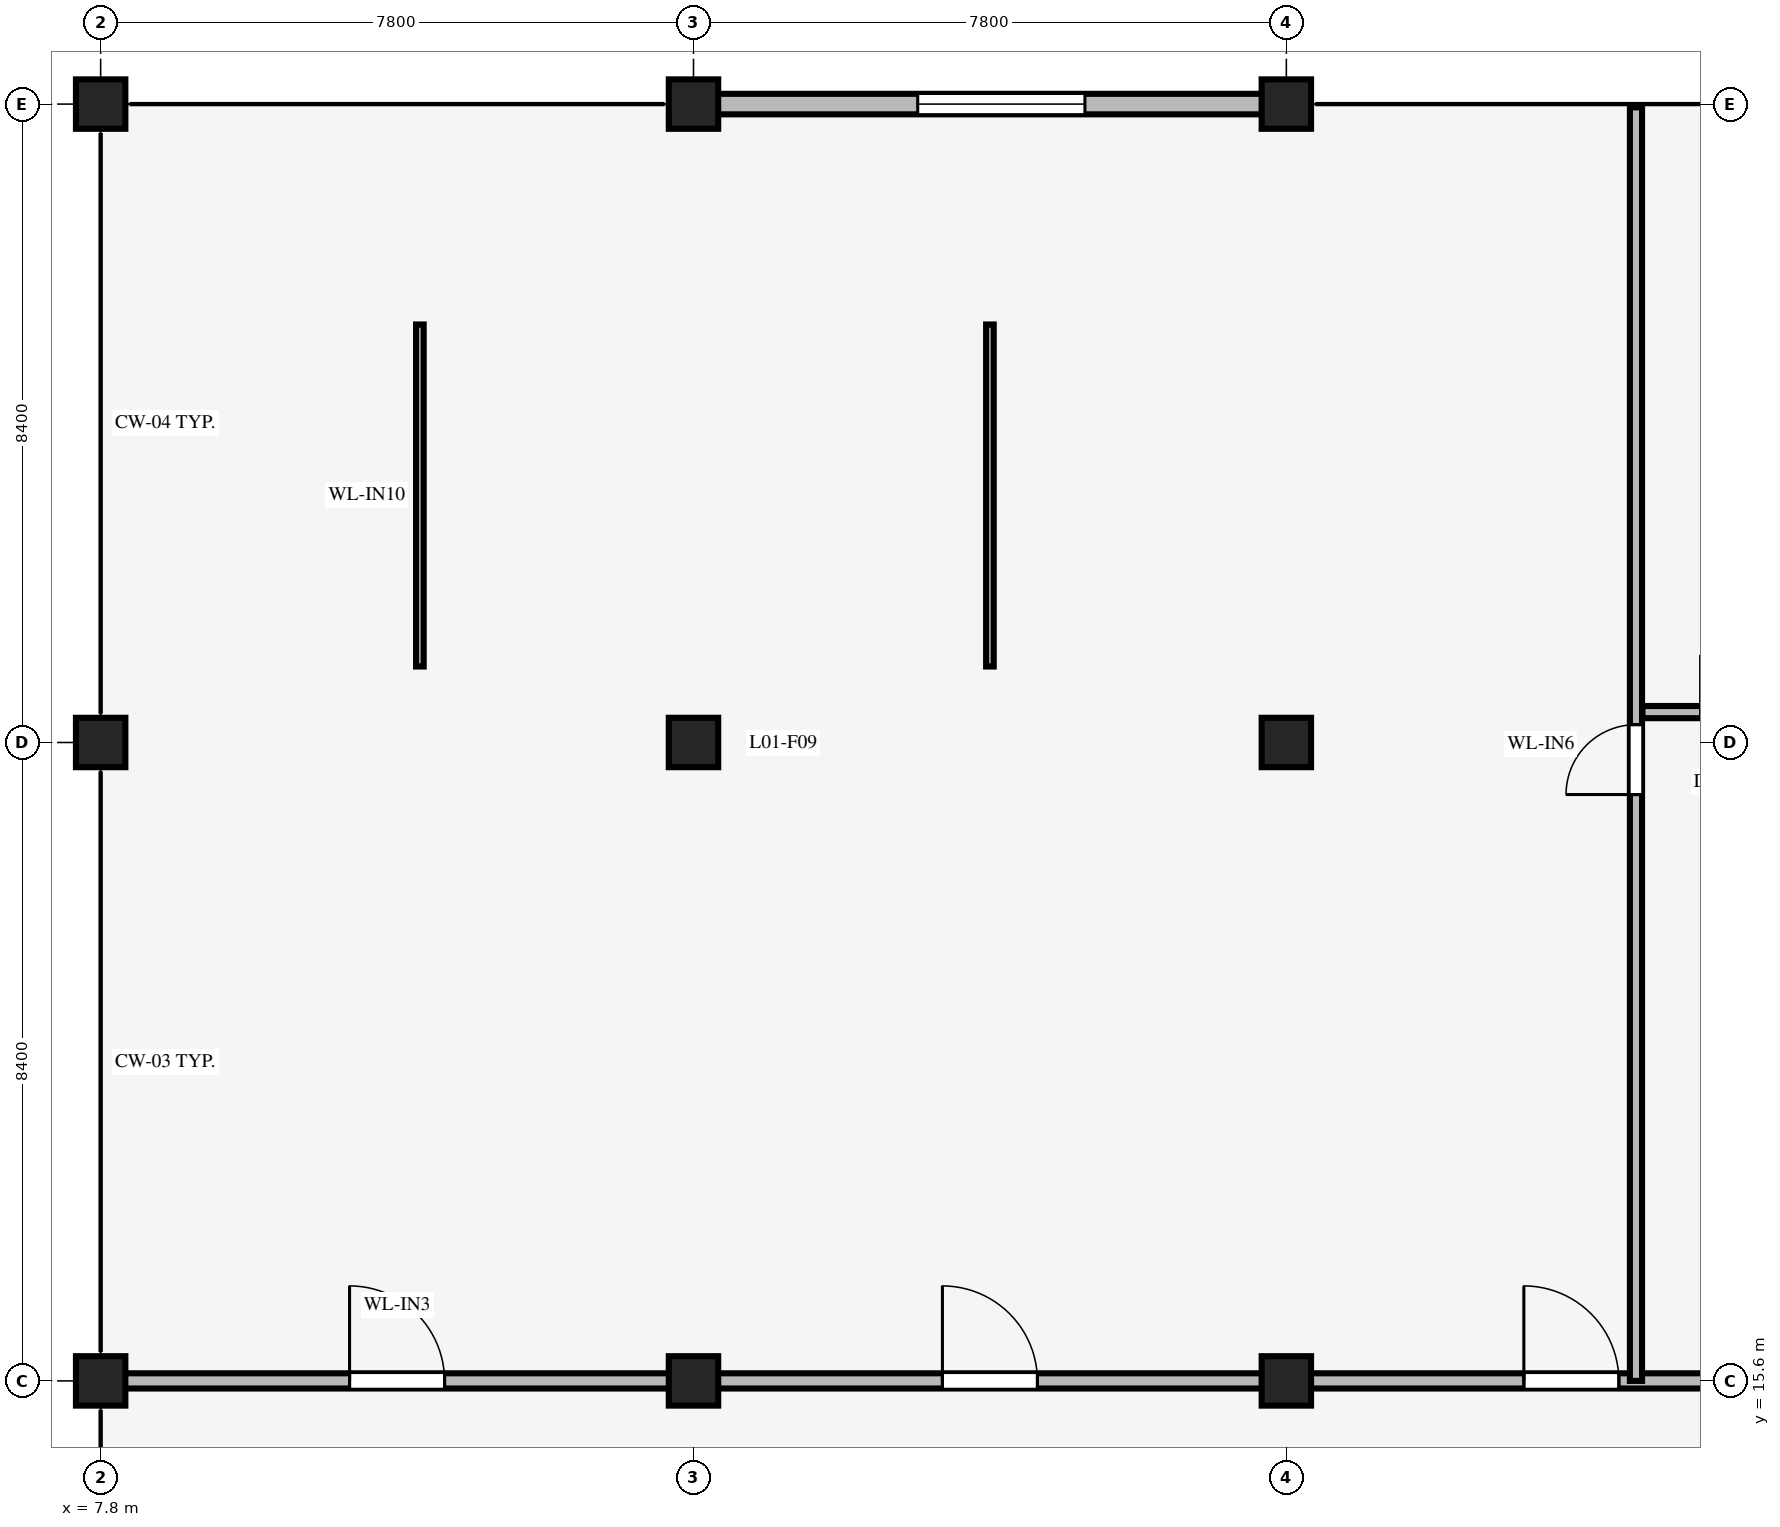
"""IFC4 building model, lengths in metres.
Left out: names, types, materials, properties, quantities, classifications, styles, units other than length and angle.
Written with IfcOpenShell. Run it as: python <this file> out.ifc"""

import sys

from ifc_helpers import new_model, si_unit, direction, frame, frame_2d, origin, origin_2d, place, context, subcontext, project, spatial, rectangle, extrude, element, fill, save


model = new_model("IFC4")
c1 = context("Model", 3, precision=1e-05, world=origin(), true_north=direction((0.0, 1.0)))
c2 = subcontext(c1, "Body", "Model", "MODEL_VIEW")
j1 = project(units=[si_unit("LENGTHUNIT", "METRE"), si_unit("PLANEANGLEUNIT", "RADIAN")], contexts=[c1])
p1 = place(None, origin())
s1 = spatial("IfcSite", under=j1, at=p1, CompositionType="ELEMENT")
p2 = place(p1, origin())
s2 = spatial("IfcBuilding", under=s1, at=p2, CompositionType="ELEMENT")
p3 = place(p2, frame((0.0, 0.0, 6.0)))
s3 = spatial("IfcBuildingStorey", under=s2, at=p3, CompositionType="ELEMENT", Elevation=6.0)
for number, where, z_axis, x_axis in (
    (1, (7.8, 15.6, 0.0), (0.0, 0.0, 1.0), (1.0, 0.0, 0.0)),
    (2, (7.8, 24.0, 0.0), (0.0, 0.0, 1.0), (1.0, 0.0, 0.0)),
    (3, (7.8, 32.4, 0.0), (0.0, 0.0, 1.0), (1.0, 0.0, 0.0)),
    (4, (15.6, 15.6, 0.0), (0.0, 0.0, 1.0), (1.0, 0.0, 0.0)),
    (5, (15.6, 24.0, 0.0), (0.0, 0.0, 1.0), (1.0, 0.0, 0.0)),
    (6, (15.6, 32.4, 0.0), (0.0, 0.0, 1.0), (1.0, 0.0, 0.0)),
    (7, (23.4, 15.6, 0.0), (0.0, 0.0, 1.0), (1.0, 0.0, 0.0)),
    (8, (23.4, 24.0, 0.0), (0.0, 0.0, 1.0), (1.0, 0.0, 0.0)),
    (9, (23.4, 32.4, 0.0), (0.0, 0.0, 1.0), (1.0, 0.0, 0.0)),
):
    element("IfcColumn", number, at=place(p3, frame(where, z_axis=z_axis, x_axis=x_axis)), inside=s3, PredefinedType="COLUMN", context=c2, shape_type="SweptSolid", body=[
        extrude(rectangle(XDim=0.65, YDim=0.65, at=origin_2d()), origin(), (0.0, 0.0, 1.0), 6.0),
    ])
p4 = place(p3, frame((15.915, 32.4, 0.0), z_axis=(0.0, 0.0, 1.0), x_axis=(1.0, 0.0, 0.0)))
e10 = element("IfcWall", 10, at=p4, inside=s3, PredefinedType="STANDARD", context=c2, shape_type="SweptSolid", body=[
    extrude(rectangle(XDim=7.17, YDim=0.27, at=frame_2d((3.585, 0.0))), origin(), (0.0, 0.0, 1.0), 5.371),
])
p5 = place(p4, frame((2.635, 0.0, 0.95)))
e11 = element("IfcOpeningElement", 11, at=p5, cuts=e10, PredefinedType="OPENING", context=c2, shape_type="SweptSolid", body=[
    extrude(rectangle(XDim=2.2, YDim=1.9, at=frame_2d((1.1, 0.95))), frame((0.0, 0.145, 0.0), z_axis=(0.0, -1.0, 0.0), x_axis=(1.0, 0.0, 0.0)), (0.0, 0.0, 1.0), 0.29),
])
p6 = place(p3, frame((8.1, 15.6, 0.0), z_axis=(0.0, 0.0, 1.0), x_axis=(1.0, 0.0, 0.0)))
e12 = element("IfcWall", 12, at=p6, inside=s3, PredefinedType="STANDARD", context=c2, shape_type="SweptSolid", body=[
    extrude(rectangle(XDim=7.2, YDim=0.2, at=frame_2d((3.6, 0.0))), origin(), (0.0, 0.0, 1.0), 3.15),
])
p7 = place(p6, frame((2.975, 0.0, 0.0)))
e13 = element("IfcOpeningElement", 13, at=p7, cuts=e12, PredefinedType="OPENING", context=c2, shape_type="SweptSolid", body=[
    extrude(rectangle(XDim=1.25, YDim=2.2, at=frame_2d((0.625, 1.1))), frame((0.0, 0.11, 0.0), z_axis=(0.0, -1.0, 0.0), x_axis=(1.0, 0.0, 0.0)), (0.0, 0.0, 1.0), 0.22),
])
p8 = place(p3, frame((15.9, 15.6, 0.0), z_axis=(0.0, 0.0, 1.0), x_axis=(1.0, 0.0, 0.0)))
e14 = element("IfcWall", 14, at=p8, inside=s3, PredefinedType="STANDARD", context=c2, shape_type="SweptSolid", body=[
    extrude(rectangle(XDim=7.2, YDim=0.2, at=frame_2d((3.6, 0.0))), origin(), (0.0, 0.0, 1.0), 3.15),
])
p9 = place(p8, frame((2.975, 0.0, 0.0)))
e15 = element("IfcOpeningElement", 15, at=p9, cuts=e14, PredefinedType="OPENING", context=c2, shape_type="SweptSolid", body=[
    extrude(rectangle(XDim=1.25, YDim=2.2, at=frame_2d((0.625, 1.1))), frame((0.0, 0.11, 0.0), z_axis=(0.0, -1.0, 0.0), x_axis=(1.0, 0.0, 0.0)), (0.0, 0.0, 1.0), 0.22),
])
p10 = place(p3, frame((23.7, 15.6, 0.0), z_axis=(0.0, 0.0, 1.0), x_axis=(1.0, 0.0, 0.0)))
e16 = element("IfcWall", 16, at=p10, inside=s3, PredefinedType="STANDARD", context=c2, shape_type="SweptSolid", body=[
    extrude(rectangle(XDim=7.2, YDim=0.2, at=frame_2d((3.6, 0.0))), origin(), (0.0, 0.0, 1.0), 3.15),
])
p11 = place(p10, frame((2.825, 0.0, 0.0)))
e17 = element("IfcOpeningElement", 17, at=p11, cuts=e16, PredefinedType="OPENING", context=c2, shape_type="SweptSolid", body=[
    extrude(rectangle(XDim=1.25, YDim=2.2, at=frame_2d((0.625, 1.1))), frame((0.0, 0.11, 0.0), z_axis=(0.0, -1.0, 0.0), x_axis=(1.0, 0.0, 0.0)), (0.0, 0.0, 1.0), 0.22),
])
p12 = place(p3, frame((28.0, 15.6, 0.0), z_axis=(0.0, 0.0, 1.0), x_axis=(0.0, 1.0, 0.0)))
e18 = element("IfcWall", 18, at=p12, inside=s3, PredefinedType="STANDARD", context=c2, shape_type="SweptSolid", body=[
    extrude(rectangle(XDim=16.757, YDim=0.16, at=frame_2d((8.379, 0.0))), origin(), (0.0, 0.0, 1.0), 3.15),
])
p13 = place(p12, frame((7.715, 0.0, 0.0)))
e19 = element("IfcOpeningElement", 19, at=p13, cuts=e18, PredefinedType="OPENING", context=c2, shape_type="SweptSolid", body=[
    extrude(rectangle(XDim=0.92, YDim=2.15, at=frame_2d((0.46, 1.075))), frame((0.0, 0.09, 0.0), z_axis=(0.0, -1.0, 0.0), x_axis=(1.0, 0.0, 0.0)), (0.0, 0.0, 1.0), 0.18),
])
for number, where, z_axis, x_axis in (
    (20, (12.0, 25.0, 0.0), (0.0, 0.0, 1.0), (0.0, 1.0, 0.0)),
    (21, (19.5, 25.0, 0.0), (0.0, 0.0, 1.0), (0.0, 1.0, 0.0)),
):
    element("IfcWall", number, at=place(p3, frame(where, z_axis=z_axis, x_axis=x_axis)), inside=s3, PredefinedType="STANDARD", context=c2, shape_type="SweptSolid", body=[
        extrude(rectangle(XDim=4.5, YDim=0.1, at=frame_2d((2.25, 0.0))), origin(), (0.0, 0.0, 1.0), 3.15),
    ])
p14 = place(p3, frame((28.085, 24.4, 0.0), z_axis=(0.0, 0.0, 1.0), x_axis=(1.0, 0.0, 0.0)))
e22 = element("IfcWall", 22, at=p14, inside=s3, PredefinedType="STANDARD", context=c2, shape_type="SweptSolid", body=[
    extrude(rectangle(XDim=8.615, YDim=0.16, at=frame_2d((4.308, 0.0))), origin(), (0.0, 0.0, 1.0), 3.15),
])
p15 = place(p14, frame((0.765, 0.0, 0.0)))
e23 = element("IfcOpeningElement", 23, at=p15, cuts=e22, PredefinedType="OPENING", context=c2, shape_type="SweptSolid", body=[
    extrude(rectangle(XDim=1.5, YDim=2.2, at=frame_2d((0.75, 1.1))), frame((0.0, 0.09, 0.0), z_axis=(0.0, -1.0, 0.0), x_axis=(1.0, 0.0, 0.0)), (0.0, 0.0, 1.0), 0.18),
])
p16 = place(p14, frame((2.715, 0.0, 0.9)))
e24 = element("IfcOpeningElement", 24, at=p16, cuts=e22, PredefinedType="OPENING", context=c2, shape_type="SweptSolid", body=[
    extrude(rectangle(XDim=1.8, YDim=1.8, at=frame_2d((0.9, 0.9))), frame((0.0, 0.09, 0.0), z_axis=(0.0, -1.0, 0.0), x_axis=(1.0, 0.0, 0.0)), (0.0, 0.0, 1.0), 0.18),
])
p17 = place(p5, origin())
e25 = element("IfcWindow", 25, at=p17, inside=s3, PartitioningType="SINGLE_PANEL", PredefinedType="WINDOW", context=c2, shape_type="SweptSolid", body=[
    extrude(rectangle(XDim=2.2, YDim=1.9, at=frame_2d((1.1, 0.95))), frame((0.0, 0.03, 0.0), z_axis=(0.0, -1.0, 0.0), x_axis=(1.0, 0.0, 0.0)), (0.0, 0.0, 1.0), 0.06),
])
fill(e11, e25)
p18 = place(p7, origin())
e26 = element("IfcDoor", 26, at=p18, inside=s3, OperationType="SINGLE_SWING_LEFT", PredefinedType="DOOR", context=c2, shape_type="SweptSolid", body=[
    extrude(rectangle(XDim=1.25, YDim=2.2, at=frame_2d((0.625, 1.1))), frame((0.0, 0.025, 0.0), z_axis=(0.0, -1.0, 0.0), x_axis=(1.0, 0.0, 0.0)), (0.0, 0.0, 1.0), 0.05),
])
fill(e13, e26)
p19 = place(p9, origin())
e27 = element("IfcDoor", 27, at=p19, inside=s3, OperationType="SINGLE_SWING_LEFT", PredefinedType="DOOR", context=c2, shape_type="SweptSolid", body=[
    extrude(rectangle(XDim=1.25, YDim=2.2, at=frame_2d((0.625, 1.1))), frame((0.0, 0.025, 0.0), z_axis=(0.0, -1.0, 0.0), x_axis=(1.0, 0.0, 0.0)), (0.0, 0.0, 1.0), 0.05),
])
fill(e15, e27)
p20 = place(p11, origin())
e28 = element("IfcDoor", 28, at=p20, inside=s3, OperationType="SINGLE_SWING_LEFT", PredefinedType="DOOR", context=c2, shape_type="SweptSolid", body=[
    extrude(rectangle(XDim=1.25, YDim=2.2, at=frame_2d((0.625, 1.1))), frame((0.0, 0.025, 0.0), z_axis=(0.0, -1.0, 0.0), x_axis=(1.0, 0.0, 0.0)), (0.0, 0.0, 1.0), 0.05),
])
fill(e17, e28)
p21 = place(p13, origin())
e29 = element("IfcDoor", 29, at=p21, inside=s3, OperationType="SINGLE_SWING_LEFT", PredefinedType="DOOR", context=c2, shape_type="SweptSolid", body=[
    extrude(rectangle(XDim=0.92, YDim=2.15, at=frame_2d((0.46, 1.075))), frame((0.0, 0.025, 0.0), z_axis=(0.0, -1.0, 0.0), x_axis=(1.0, 0.0, 0.0)), (0.0, 0.0, 1.0), 0.05),
])
fill(e19, e29)
save(model, sys.argv[1])
